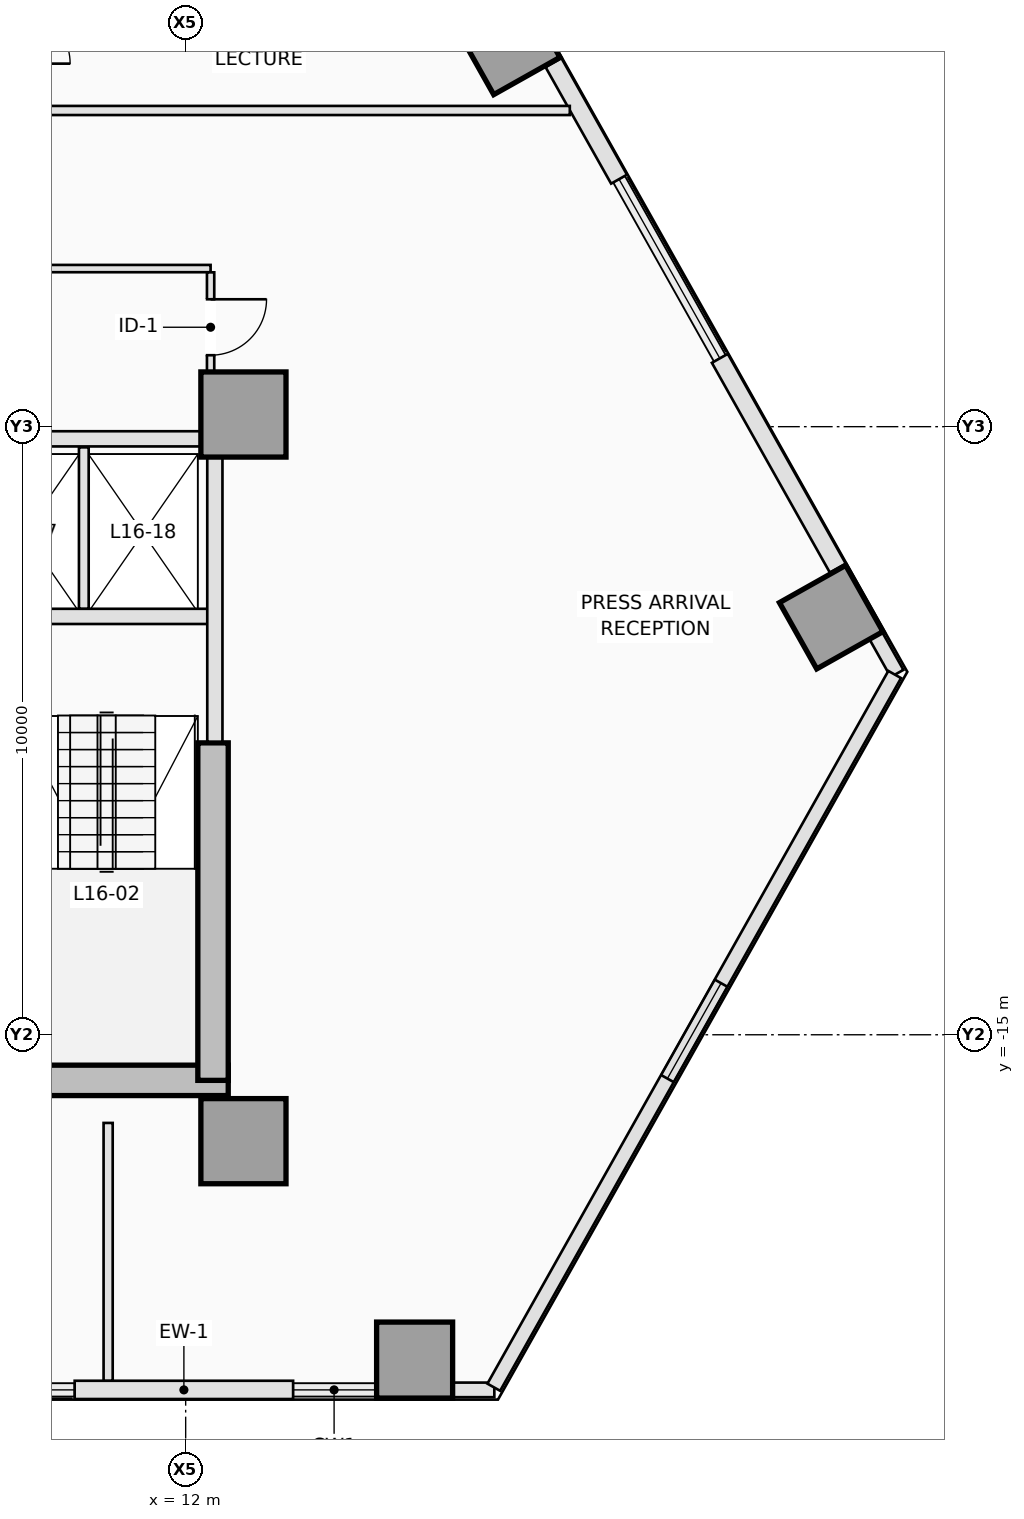
"""IFC4 building model, lengths in metres.
Left out: names, types, materials, properties, quantities, classifications, styles, units other than length and angle.
Written with IfcOpenShell. Run it as: python <this file> out.ifc"""

import sys

from ifc_helpers import new_model, si_unit, direction, frame, frame_2d, origin, origin_2d, place, context, subcontext, project, spatial, rectangle, extrude, element, fill, save


model = new_model("IFC4")
c1 = context("Model", 3, precision=1e-05, world=origin(), true_north=direction((0.0, 1.0)))
c2 = subcontext(c1, "Body", "Model", "MODEL_VIEW")
j1 = project(units=[si_unit("LENGTHUNIT", "METRE"), si_unit("PLANEANGLEUNIT", "RADIAN")], contexts=[c1])
p1 = place(None, origin())
s1 = spatial("IfcSite", under=j1, at=p1, CompositionType="ELEMENT")
p2 = place(p1, origin())
s2 = spatial("IfcBuilding", under=s1, at=p2, CompositionType="ELEMENT")
p3 = place(p2, frame((0.0, 0.0, 62.6)))
s3 = spatial("IfcBuildingStorey", under=s2, at=p3, CompositionType="ELEMENT", Elevation=62.6)
p4 = place(p3, frame((8.7, -15.75, 0.0), z_axis=(0.0, 0.0, 1.0), x_axis=(1.0, 0.0, 0.0)))
e1 = element("IfcWall", 1, at=p4, inside=s3, PredefinedType="SHEAR", context=c2, shape_type="SweptSolid", body=[
    extrude(rectangle(XDim=4.0, YDim=0.5, at=frame_2d((2.0, 0.0))), origin(), (0.0, 0.0, 1.0), 3.5),
])
p5 = place(p3, frame((12.45, -15.75, 0.0), z_axis=(0.0, 0.0, 1.0), x_axis=(0.0, 1.0, 0.0)))
e2 = element("IfcWall", 2, at=p5, inside=s3, PredefinedType="SHEAR", context=c2, shape_type="SweptSolid", body=[
    extrude(rectangle(XDim=5.55, YDim=0.5, at=frame_2d((2.775, 0.0))), origin(), (0.0, 0.0, 1.0), 3.5),
])
for number, where, z_axis, x_axis in (
    (3, (12.95, -16.75, 0.0), (0.0, 0.0, 1.0), (1.0, 0.0, 0.0)),
    (4, (12.95, -4.8, 0.0), (0.0, 0.0, 1.0), (1.0, 0.0, 0.0)),
):
    element("IfcColumn", number, at=place(p3, frame(where, z_axis=z_axis, x_axis=x_axis)), inside=s3, PredefinedType="COLUMN", context=c2, shape_type="SweptSolid", body=[
        extrude(rectangle(XDim=1.4, YDim=1.4, at=origin_2d()), origin(), (0.0, 0.0, 1.0), 3.5),
    ])
for number, where, z_axis, x_axis in (
    (5, (15.765, -20.35, 0.0), (0.0, 0.0, 1.0), (0.0, 1.0, 0.0)),
    (6, (22.616, -8.132, 0.0), (0.0, 0.0, 1.0), (0.872, 0.49, 0.0)),
    (7, (17.304, 1.312, 0.0), (0.0, 0.0, 1.0), (0.872, 0.49, 0.0)),
):
    element("IfcColumn", number, at=place(p3, frame(where, z_axis=z_axis, x_axis=x_axis)), inside=s3, PredefinedType="COLUMN", context=c2, shape_type="SweptSolid", body=[
        extrude(rectangle(XDim=1.25, YDim=1.25, at=origin_2d()), origin(), (0.0, 0.0, 1.0), 3.5),
    ])
p6 = place(p3, frame((17.076, -20.84, 0.0), z_axis=(0.0, 0.0, 1.0), x_axis=(-1.0, 0.0, 0.0)))
e8 = element("IfcWall", 8, at=p6, inside=s3, PredefinedType="STANDARD", context=c2, shape_type="SweptSolid", body=[
    extrude(rectangle(XDim=0.681, YDim=0.24, at=frame_2d((0.34, 0.0))), origin(), (0.0, 0.0, 1.0), 3.25),
])
p7 = place(p3, frame((13.767, -20.84, 0.0), z_axis=(0.0, 0.0, 1.0), x_axis=(-1.0, 0.0, 0.0)))
e9 = element("IfcWall", 9, at=p7, inside=s3, PredefinedType="STANDARD", context=c2, shape_type="SweptSolid", body=[
    extrude(rectangle(XDim=3.592, YDim=0.3, at=frame_2d((1.796, 0.0))), origin(), (0.0, 0.0, 1.0), 3.25),
])
p8 = place(p3, frame((23.352, -8.441, 0.0), z_axis=(0.0, 0.0, 1.0), x_axis=(0.490523074758, -0.871428203084, 0.0)))
e10 = element("IfcWall", 10, at=p8, inside=s3, PredefinedType="STANDARD", context=c2, shape_type="SweptSolid", body=[
    extrude(rectangle(XDim=0.708, YDim=0.24, at=frame_2d((0.354, 0.0))), origin(), (0.0, 0.0, 1.0), 3.25),
])
p9 = place(p3, frame((18.05, 0.986, 0.0), z_axis=(0.0, 0.0, 1.0), x_axis=(0.490277063651, -0.871566635925, 0.0)))
e11 = element("IfcWall", 11, at=p9, inside=s3, PredefinedType="STANDARD", context=c2, shape_type="SweptSolid", body=[
    extrude(rectangle(XDim=2.198, YDim=0.3, at=frame_2d((1.099, 0.0))), origin(), (0.0, 0.0, 1.0), 3.25),
])
p10 = place(p3, frame((20.784, -3.876, 0.0), z_axis=(0.0, 0.0, 1.0), x_axis=(0.490267098362, -0.871572241563, 0.0)))
e12 = element("IfcWall", 12, at=p10, inside=s3, PredefinedType="STANDARD", context=c2, shape_type="SweptSolid", body=[
    extrude(rectangle(XDim=3.957, YDim=0.3, at=frame_2d((1.979, 0.0))), origin(), (0.0, 0.0, 1.0), 3.25),
])
p11 = place(p3, frame((17.067, -20.796, 0.0), z_axis=(0.0, 0.0, 1.0), x_axis=(0.490268135177, 0.871571658345, 0.0)))
e13 = element("IfcWall", 13, at=p11, inside=s3, PredefinedType="STANDARD", context=c2, shape_type="SweptSolid", body=[
    extrude(rectangle(XDim=13.448, YDim=0.24, at=frame_2d((6.724, 0.0))), origin(), (0.0, 0.0, 1.0), 3.25),
])
p12 = place(p11, frame((5.824, 0.0, 0.9)))
e14 = element("IfcOpeningElement", 14, at=p12, cuts=e13, PredefinedType="OPENING", context=c2, shape_type="SweptSolid", body=[
    extrude(rectangle(XDim=1.8, YDim=2.1, at=frame_2d((0.9, 1.05))), frame((0.0, 0.13, 0.0), z_axis=(0.0, -1.0, 0.0), x_axis=(1.0, 0.0, 0.0)), (0.0, 0.0, 1.0), 0.26),
])
p13 = place(p3, frame((9.16, -8.12, 0.0), z_axis=(0.0, 0.0, 1.0), x_axis=(1.0, 0.0, 0.0)))
e15 = element("IfcWall", 15, at=p13, inside=s3, PredefinedType="PARTITIONING", context=c2, shape_type="SweptSolid", body=[
    extrude(rectangle(XDim=3.22, YDim=0.25, at=frame_2d((1.61, 0.0))), origin(), (0.0, 0.0, 1.0), 3.25),
])
p14 = place(p3, frame((12.48, -10.18, 0.0), z_axis=(0.0, 0.0, 1.0), x_axis=(0.0, 1.0, 0.0)))
e16 = element("IfcWall", 16, at=p14, inside=s3, PredefinedType="PARTITIONING", context=c2, shape_type="SweptSolid", body=[
    extrude(rectangle(XDim=4.678, YDim=0.25, at=frame_2d((2.339, 0.0))), origin(), (0.0, 0.0, 1.0), 3.25),
])
p15 = place(p3, frame((4.452, -5.2, 0.0), z_axis=(0.0, 0.0, 1.0), x_axis=(1.0, 0.0, 0.0)))
e17 = element("IfcWall", 17, at=p15, inside=s3, PredefinedType="PARTITIONING", context=c2, shape_type="SweptSolid", body=[
    extrude(rectangle(XDim=7.796, YDim=0.25, at=frame_2d((3.898, 0.0))), origin(), (0.0, 0.0, 1.0), 3.25),
])
p16 = place(p3, frame((10.325, -7.993, 0.0), z_axis=(0.0, 0.0, 1.0), x_axis=(0.0, 1.0, 0.0)))
e18 = element("IfcWall", 18, at=p16, inside=s3, PredefinedType="PARTITIONING", context=c2, shape_type="SweptSolid", body=[
    extrude(rectangle(XDim=2.653, YDim=0.16, at=frame_2d((1.326, 0.0))), origin(), (0.0, 0.0, 1.0), 3.25),
])
p17 = place(p3, frame((9.242, -2.4, 0.0), z_axis=(0.0, 0.0, 1.0), x_axis=(1.0, 0.0, 0.0)))
e19 = element("IfcWall", 19, at=p17, inside=s3, PredefinedType="PARTITIONING", context=c2, shape_type="SweptSolid", body=[
    extrude(rectangle(XDim=3.168, YDim=0.12, at=frame_2d((1.584, 0.0))), origin(), (0.0, 0.0, 1.0), 3.25),
])
p18 = place(p3, frame((12.41, -2.462, 0.0), z_axis=(0.0, 0.0, 1.0), x_axis=(0.0, -1.0, 0.0)))
e20 = element("IfcWall", 20, at=p18, inside=s3, PredefinedType="PARTITIONING", context=c2, shape_type="SweptSolid", body=[
    extrude(rectangle(XDim=1.636, YDim=0.12, at=frame_2d((0.818, 0.0))), origin(), (0.0, 0.0, 1.0), 3.25),
])
p19 = place(p18, frame((0.443, 0.0, 0.0)))
e21 = element("IfcOpeningElement", 21, at=p19, cuts=e20, PredefinedType="OPENING", context=c2, shape_type="SweptSolid", body=[
    extrude(rectangle(XDim=0.92, YDim=2.12, at=frame_2d((0.46, 1.06))), frame((0.0, 0.07, 0.0), z_axis=(0.0, -1.0, 0.0), x_axis=(1.0, 0.0, 0.0)), (0.0, 0.0, 1.0), 0.14),
])
p20 = place(p3, frame((18.317, 0.2, 0.0), z_axis=(0.0, 0.0, 1.0), x_axis=(-1.0, 0.0, 0.0)))
e22 = element("IfcWall", 22, at=p20, inside=s3, PredefinedType="PARTITIONING", context=c2, shape_type="SweptSolid", body=[
    extrude(rectangle(XDim=9.027, YDim=0.15, at=frame_2d((4.514, 0.0))), origin(), (0.0, 0.0, 1.0), 3.25),
])
p21 = place(p3, frame((10.725, -20.688, 0.0), z_axis=(0.0, 0.0, 1.0), x_axis=(0.0, 1.0, 0.0)))
e23 = element("IfcWall", 23, at=p21, inside=s3, PredefinedType="PARTITIONING", context=c2, shape_type="SweptSolid", body=[
    extrude(rectangle(XDim=4.238, YDim=0.15, at=frame_2d((2.119, 0.0))), origin(), (0.0, 0.0, 1.0), 3.25),
])
p22 = place(p12, origin())
e24 = element("IfcWindow", 24, at=p22, inside=s3, PartitioningType="SINGLE_PANEL", PredefinedType="WINDOW", context=c2, shape_type="SweptSolid", body=[
    extrude(rectangle(XDim=1.8, YDim=2.1, at=frame_2d((0.9, 1.05))), frame((0.0, 0.03, 0.0), z_axis=(0.0, -1.0, 0.0), x_axis=(1.0, 0.0, 0.0)), (0.0, 0.0, 1.0), 0.06),
])
fill(e14, e24)
p23 = place(p19, origin())
e25 = element("IfcDoor", 25, at=p23, inside=s3, OperationType="SINGLE_SWING_LEFT", PredefinedType="DOOR", context=c2, shape_type="SweptSolid", body=[
    extrude(rectangle(XDim=0.92, YDim=2.12, at=frame_2d((0.46, 1.06))), frame((0.0, 0.025, 0.0), z_axis=(0.0, -1.0, 0.0), x_axis=(1.0, 0.0, 0.0)), (0.0, 0.0, 1.0), 0.05),
])
fill(e21, e25)
save(model, sys.argv[1])
